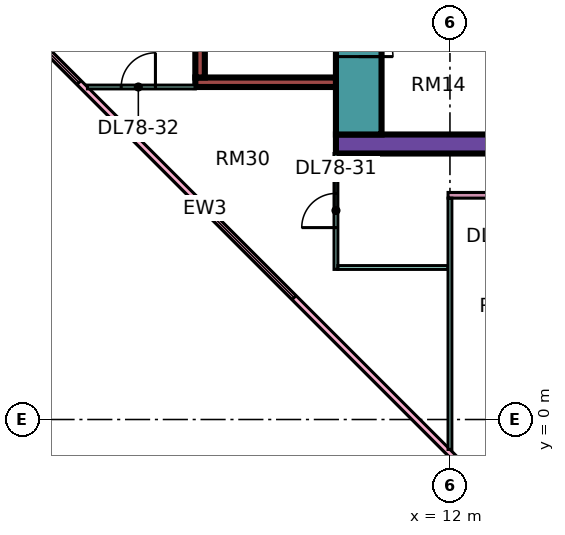
"""IFC4 building model, lengths in metres.
Left out: names, types, materials, properties, quantities, classifications, styles, units other than length and angle.
Written with IfcOpenShell. Run it as: python <this file> out.ifc"""

import sys

from ifc_helpers import new_model, si_unit, direction, frame, frame_2d, origin, place, context, subcontext, project, spatial, rectangle, extrude, element, fill, save


model = new_model("IFC4")
c1 = context("Model", 3, precision=1e-05, world=origin(), true_north=direction((0.0, 1.0)))
c2 = subcontext(c1, "Body", "Model", "MODEL_VIEW")
j1 = project(units=[si_unit("LENGTHUNIT", "METRE"), si_unit("PLANEANGLEUNIT", "RADIAN")], contexts=[c1])
p1 = place(None, origin())
s1 = spatial("IfcSite", under=j1, at=p1, CompositionType="ELEMENT")
p2 = place(p1, origin())
s2 = spatial("IfcBuilding", under=s1, at=p2, CompositionType="ELEMENT")
p3 = place(p2, frame((0.0, 0.0, 338.9)))
s3 = spatial("IfcBuildingStorey", under=s2, at=p3, CompositionType="ELEMENT", Elevation=338.9)
p4 = place(p3, frame((9.0, 7.25, 0.0), z_axis=(0.0, 0.0, 1.0), x_axis=(1.0, 0.0, 0.0)))
e1 = element("IfcWall", 1, at=p4, inside=s3, PredefinedType="SHEAR", context=c2, shape_type="SweptSolid", body=[
    extrude(rectangle(XDim=25.0, YDim=0.5, at=frame_2d((12.5, 0.0))), origin(), (0.0, 0.0, 1.0), 3.75),
])
p5 = place(p3, frame((9.6, 7.5, 0.0), z_axis=(0.0, 0.0, 1.0), x_axis=(0.0, 1.0, 0.0)))
e2 = element("IfcWall", 2, at=p5, inside=s3, PredefinedType="SHEAR", context=c2, shape_type="SweptSolid", body=[
    extrude(rectangle(XDim=12.0, YDim=1.2, at=frame_2d((6.0, 0.0))), origin(), (0.0, 0.0, 1.0), 3.75),
])
p6 = place(p5, frame((4.375, 0.0, 0.0)))
e3 = element("IfcOpeningElement", 3, at=p6, cuts=e2, PredefinedType="OPENING", context=c2, shape_type="SweptSolid", body=[
    extrude(rectangle(XDim=1.1, YDim=2.2, at=frame_2d((0.55, 1.1))), frame((0.0, 0.61, 0.0), z_axis=(0.0, -1.0, 0.0), x_axis=(1.0, 0.0, 0.0)), (0.0, 0.0, 1.0), 1.22),
])
p7 = place(p5, frame((6.875, 0.0, 0.0)))
e4 = element("IfcOpeningElement", 4, at=p7, cuts=e2, PredefinedType="OPENING", context=c2, shape_type="SweptSolid", body=[
    extrude(rectangle(XDim=1.1, YDim=2.2, at=frame_2d((0.55, 1.1))), frame((0.0, 0.61, 0.0), z_axis=(0.0, -1.0, 0.0), x_axis=(1.0, 0.0, 0.0)), (0.0, 0.0, 1.0), 1.22),
])
p8 = place(p5, frame((9.85, 0.0, 0.0)))
e5 = element("IfcOpeningElement", 5, at=p8, cuts=e2, PredefinedType="OPENING", context=c2, shape_type="SweptSolid", body=[
    extrude(rectangle(XDim=1.1, YDim=2.2, at=frame_2d((0.55, 1.1))), frame((0.0, 0.61, 0.0), z_axis=(0.0, -1.0, 0.0), x_axis=(1.0, 0.0, 0.0)), (0.0, 0.0, 1.0), 1.22),
])
p9 = place(p5, frame((2.05, 0.0, 0.0)))
e6 = element("IfcOpeningElement", 6, at=p9, cuts=e2, PredefinedType="OPENING", context=c2, shape_type="SweptSolid", body=[
    extrude(rectangle(XDim=0.9, YDim=2.1, at=frame_2d((0.45, 1.05))), frame((0.0, 0.61, 0.0), z_axis=(0.0, -1.0, 0.0), x_axis=(1.0, 0.0, 0.0)), (0.0, 0.0, 1.0), 1.22),
])
p10 = place(p3, frame((5.3, 8.875, 0.0), z_axis=(0.0, 0.0, 1.0), x_axis=(1.0, 0.0, 0.0)))
e7 = element("IfcWall", 7, at=p10, inside=s3, PredefinedType="SHEAR", context=c2, shape_type="SweptSolid", body=[
    extrude(rectangle(XDim=3.7, YDim=0.25, at=frame_2d((1.85, 0.0))), origin(), (0.0, 0.0, 1.0), 3.75),
])
p11 = place(p3, frame((5.425, 9.0, 0.0), z_axis=(0.0, 0.0, 1.0), x_axis=(0.0, 1.0, 0.0)))
e8 = element("IfcWall", 8, at=p11, inside=s3, PredefinedType="SHEAR", context=c2, shape_type="SweptSolid", body=[
    extrude(rectangle(XDim=4.0, YDim=0.25, at=frame_2d((2.0, 0.0))), origin(), (0.0, 0.0, 1.0), 3.75),
])
p12 = place(p3, frame((-1.447, 12.553, 0.0), z_axis=(0.0, 0.0, 1.0), x_axis=(0.707106781187, -0.707106781187, 0.0)))
e9 = element("IfcWall", 9, at=p12, inside=s3, PredefinedType="SOLIDWALL", context=c2, shape_type="SweptSolid", body=[
    extrude(rectangle(XDim=19.799, YDim=0.15, at=frame_2d((9.899, 0.0))), origin(), (0.0, 0.0, 1.0), 3.35),
])
p13 = place(p12, frame((2.212, 0.0, 0.45)))
e10 = element("IfcOpeningElement", 10, at=p13, cuts=e9, PredefinedType="OPENING", context=c2, shape_type="SweptSolid", body=[
    extrude(rectangle(XDim=3.0, YDim=2.4, at=frame_2d((1.5, 1.2))), frame((0.0, 0.085, 0.0), z_axis=(0.0, -1.0, 0.0), x_axis=(1.0, 0.0, 0.0)), (0.0, 0.0, 1.0), 0.17),
])
p14 = place(p12, frame((10.216, 0.0, 0.45)))
e11 = element("IfcOpeningElement", 11, at=p14, cuts=e9, PredefinedType="OPENING", context=c2, shape_type="SweptSolid", body=[
    extrude(rectangle(XDim=3.0, YDim=2.4, at=frame_2d((1.5, 1.2))), frame((0.0, 0.085, 0.0), z_axis=(0.0, -1.0, 0.0), x_axis=(1.0, 0.0, 0.0)), (0.0, 0.0, 1.0), 0.17),
])
p15 = place(p3, frame((2.461, 8.75, 0.0), z_axis=(0.0, 0.0, 1.0), x_axis=(1.0, 0.0, 0.0)))
e12 = element("IfcWall", 12, at=p15, inside=s3, PredefinedType="PARTITIONING", context=c2, shape_type="SweptSolid", body=[
    extrude(rectangle(XDim=2.839, YDim=0.1, at=frame_2d((1.419, 0.0))), origin(), (0.0, 0.0, 1.0), 3.35),
])
p16 = place(p15, frame((0.889, 0.0, 0.0)))
e13 = element("IfcOpeningElement", 13, at=p16, cuts=e12, PredefinedType="OPENING", context=c2, shape_type="SweptSolid", body=[
    extrude(rectangle(XDim=0.9, YDim=2.1, at=frame_2d((0.45, 1.05))), frame((0.0, 0.06, 0.0), z_axis=(0.0, -1.0, 0.0), x_axis=(1.0, 0.0, 0.0)), (0.0, 0.0, 1.0), 0.12),
])
p17 = place(p3, frame((9.0, 3.95, 0.0), z_axis=(0.0, 0.0, 1.0), x_axis=(0.0, 1.0, 0.0)))
e14 = element("IfcWall", 14, at=p17, inside=s3, PredefinedType="PARTITIONING", context=c2, shape_type="SweptSolid", body=[
    extrude(rectangle(XDim=3.05, YDim=0.1, at=frame_2d((1.525, 0.0))), origin(), (0.0, 0.0, 1.0), 3.35),
])
p18 = place(p17, frame((1.1, 0.0, 0.0)))
e15 = element("IfcOpeningElement", 15, at=p18, cuts=e14, PredefinedType="OPENING", context=c2, shape_type="SweptSolid", body=[
    extrude(rectangle(XDim=0.9, YDim=2.1, at=frame_2d((0.45, 1.05))), frame((0.0, 0.06, 0.0), z_axis=(0.0, -1.0, 0.0), x_axis=(1.0, 0.0, 0.0)), (0.0, 0.0, 1.0), 0.12),
])
p19 = place(p3, frame((9.05, 4.0, 0.0), z_axis=(0.0, 0.0, 1.0), x_axis=(1.0, 0.0, 0.0)))
e16 = element("IfcWall", 16, at=p19, inside=s3, PredefinedType="PARTITIONING", context=c2, shape_type="SweptSolid", body=[
    extrude(rectangle(XDim=2.9, YDim=0.1, at=frame_2d((1.45, 0.0))), origin(), (0.0, 0.0, 1.0), 3.35),
])
p20 = place(p3, frame((11.95, 5.9, 0.0), z_axis=(0.0, 0.0, 1.0), x_axis=(1.0, 0.0, 0.0)))
e17 = element("IfcWall", 17, at=p20, inside=s3, PredefinedType="PARTITIONING", context=c2, shape_type="SweptSolid", body=[
    extrude(rectangle(XDim=21.1, YDim=0.15, at=frame_2d((10.55, 0.0))), origin(), (0.0, 0.0, 1.0), 3.35),
])
p21 = place(p20, frame((1.1, 0.0, 0.0)))
e18 = element("IfcOpeningElement", 18, at=p21, cuts=e17, PredefinedType="OPENING", context=c2, shape_type="SweptSolid", body=[
    extrude(rectangle(XDim=0.9, YDim=2.1, at=frame_2d((0.45, 1.05))), frame((0.0, 0.085, 0.0), z_axis=(0.0, -1.0, 0.0), x_axis=(1.0, 0.0, 0.0)), (0.0, 0.0, 1.0), 0.17),
])
p22 = place(p20, frame((16.1, 0.0, 0.0)))
e19 = element("IfcOpeningElement", 19, at=p22, cuts=e17, PredefinedType="OPENING", context=c2, shape_type="SweptSolid", body=[
    extrude(rectangle(XDim=0.9, YDim=2.1, at=frame_2d((0.45, 1.05))), frame((0.0, 0.085, 0.0), z_axis=(0.0, -1.0, 0.0), x_axis=(1.0, 0.0, 0.0)), (0.0, 0.0, 1.0), 0.17),
])
p23 = place(p20, frame((7.1, 0.0, 0.0)))
e20 = element("IfcOpeningElement", 20, at=p23, cuts=e17, PredefinedType="OPENING", context=c2, shape_type="SweptSolid", body=[
    extrude(rectangle(XDim=0.9, YDim=2.1, at=frame_2d((0.45, 1.05))), frame((0.0, 0.085, 0.0), z_axis=(0.0, -1.0, 0.0), x_axis=(1.0, 0.0, 0.0)), (0.0, 0.0, 1.0), 0.17),
])
p24 = place(p3, frame((12.0, -0.788, 0.0), z_axis=(0.0, 0.0, 1.0), x_axis=(0.0, 1.0, 0.0)))
e21 = element("IfcWall", 21, at=p24, inside=s3, PredefinedType="PARTITIONING", context=c2, shape_type="SweptSolid", body=[
    extrude(rectangle(XDim=6.613, YDim=0.1, at=frame_2d((3.306, 0.0))), origin(), (0.0, 0.0, 1.0), 3.35),
])
p25 = place(p13, origin())
e22 = element("IfcWindow", 22, at=p25, inside=s3, PartitioningType="SINGLE_PANEL", PredefinedType="WINDOW", context=c2, shape_type="SweptSolid", body=[
    extrude(rectangle(XDim=3.0, YDim=2.4, at=frame_2d((1.5, 1.2))), frame((0.0, 0.03, 0.0), z_axis=(0.0, -1.0, 0.0), x_axis=(1.0, 0.0, 0.0)), (0.0, 0.0, 1.0), 0.06),
])
fill(e10, e22)
p26 = place(p14, origin())
e23 = element("IfcWindow", 23, at=p26, inside=s3, PartitioningType="SINGLE_PANEL", PredefinedType="WINDOW", context=c2, shape_type="SweptSolid", body=[
    extrude(rectangle(XDim=3.0, YDim=2.4, at=frame_2d((1.5, 1.2))), frame((0.0, 0.03, 0.0), z_axis=(0.0, -1.0, 0.0), x_axis=(1.0, 0.0, 0.0)), (0.0, 0.0, 1.0), 0.06),
])
fill(e11, e23)
p27 = place(p9, frame((0.9, 0.0, 0.0), z_axis=(0.0, 0.0, 1.0), x_axis=(-1.0, 0.0, 0.0)))
e24 = element("IfcDoor", 24, at=p27, inside=s3, OperationType="SINGLE_SWING_LEFT", PredefinedType="DOOR", context=c2, shape_type="SweptSolid", body=[
    extrude(rectangle(XDim=0.9, YDim=2.1, at=frame_2d((0.45, 1.05))), frame((0.0, 0.025, 0.0), z_axis=(0.0, -1.0, 0.0), x_axis=(1.0, 0.0, 0.0)), (0.0, 0.0, 1.0), 0.05),
])
fill(e6, e24)
p28 = place(p18, origin())
e25 = element("IfcDoor", 25, at=p28, inside=s3, OperationType="SINGLE_SWING_LEFT", PredefinedType="DOOR", context=c2, shape_type="SweptSolid", body=[
    extrude(rectangle(XDim=0.9, YDim=2.1, at=frame_2d((0.45, 1.05))), frame((0.0, 0.025, 0.0), z_axis=(0.0, -1.0, 0.0), x_axis=(1.0, 0.0, 0.0)), (0.0, 0.0, 1.0), 0.05),
])
fill(e15, e25)
p29 = place(p16, frame((0.9, 0.0, 0.0), z_axis=(0.0, 0.0, 1.0), x_axis=(-1.0, 0.0, 0.0)))
e26 = element("IfcDoor", 26, at=p29, inside=s3, OperationType="SINGLE_SWING_RIGHT", PredefinedType="DOOR", context=c2, shape_type="SweptSolid", body=[
    extrude(rectangle(XDim=0.9, YDim=2.1, at=frame_2d((0.45, 1.05))), frame((0.0, 0.025, 0.0), z_axis=(0.0, -1.0, 0.0), x_axis=(1.0, 0.0, 0.0)), (0.0, 0.0, 1.0), 0.05),
])
fill(e13, e26)
save(model, sys.argv[1])
